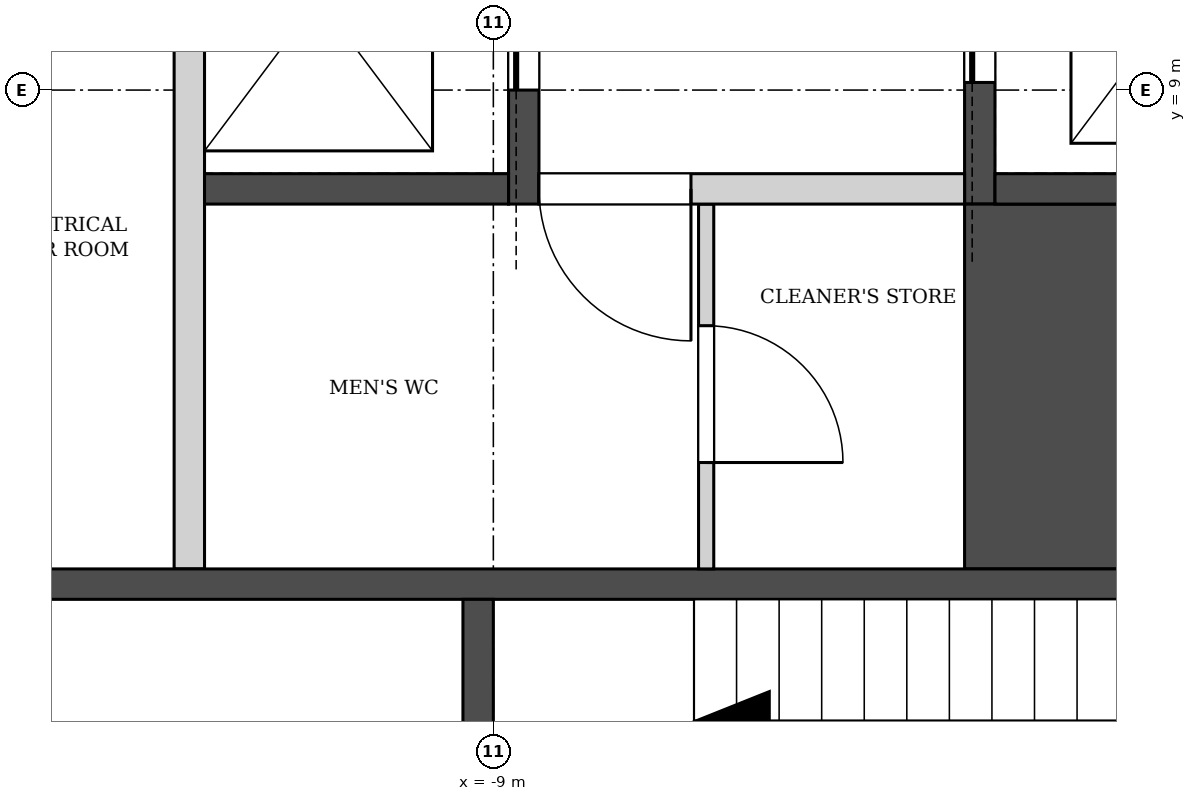
"""IFC4 building model, lengths in metres.
Left out: names, types, materials, properties, quantities, classifications, styles, units other than length and angle.
Written with IfcOpenShell. Run it as: python <this file> out.ifc"""

import sys

from ifc_helpers import new_model, si_unit, direction, frame, frame_2d, origin, place, context, subcontext, project, spatial, rectangle, extrude, element, fill, save


model = new_model("IFC4")
c1 = context("Model", 3, precision=1e-05, world=origin(), true_north=direction((0.0, 1.0)))
c2 = subcontext(c1, "Body", "Model", "MODEL_VIEW")
j1 = project(units=[si_unit("LENGTHUNIT", "METRE"), si_unit("PLANEANGLEUNIT", "RADIAN")], contexts=[c1])
p1 = place(None, origin())
s1 = spatial("IfcSite", under=j1, at=p1, CompositionType="ELEMENT")
p2 = place(p1, origin())
s2 = spatial("IfcBuilding", under=s1, at=p2, CompositionType="ELEMENT")
p3 = place(p2, frame((0.0, 0.0, 20.0)))
s3 = spatial("IfcBuildingStorey", under=s2, at=p3, CompositionType="ELEMENT", Elevation=20.0)
p4 = place(p3, frame((-4.853, 74.393, 0.0), z_axis=(0.0, 0.0, 1.0), x_axis=(-0.49999894854, -0.866026010844, 0.0)))
e1 = element("IfcWall", 1, at=p4, inside=s3, PredefinedType="SOLIDWALL", context=c2, shape_type="SweptSolid", body=[
    extrude(rectangle(XDim=76.0, YDim=0.34, at=frame_2d((38.0, 0.0))), origin(), (0.0, 0.0, 1.0), 3.0),
])
p5 = place(p4, frame((1.058, 0.0, 0.9)))
e2 = element("IfcOpeningElement", 2, at=p5, cuts=e1, PredefinedType="OPENING", context=c2, shape_type="SweptSolid", body=[
    extrude(rectangle(XDim=1.885, YDim=1.9, at=frame_2d((0.942, 0.95))), frame((0.0, 0.18, 0.0), z_axis=(0.0, -1.0, 0.0), x_axis=(1.0, 0.0, 0.0)), (0.0, 0.0, 1.0), 0.36),
])
p6 = place(p4, frame((4.058, 0.0, 0.9)))
e3 = element("IfcOpeningElement", 3, at=p6, cuts=e1, PredefinedType="OPENING", context=c2, shape_type="SweptSolid", body=[
    extrude(rectangle(XDim=1.885, YDim=1.9, at=frame_2d((0.942, 0.95))), frame((0.0, 0.18, 0.0), z_axis=(0.0, -1.0, 0.0), x_axis=(1.0, 0.0, 0.0)), (0.0, 0.0, 1.0), 0.36),
])
p7 = place(p4, frame((7.058, 0.0, 0.9)))
e4 = element("IfcOpeningElement", 4, at=p7, cuts=e1, PredefinedType="OPENING", context=c2, shape_type="SweptSolid", body=[
    extrude(rectangle(XDim=1.885, YDim=1.9, at=frame_2d((0.942, 0.95))), frame((0.0, 0.18, 0.0), z_axis=(0.0, -1.0, 0.0), x_axis=(1.0, 0.0, 0.0)), (0.0, 0.0, 1.0), 0.36),
])
p8 = place(p4, frame((10.058, 0.0, 0.9)))
e5 = element("IfcOpeningElement", 5, at=p8, cuts=e1, PredefinedType="OPENING", context=c2, shape_type="SweptSolid", body=[
    extrude(rectangle(XDim=1.885, YDim=1.9, at=frame_2d((0.942, 0.95))), frame((0.0, 0.18, 0.0), z_axis=(0.0, -1.0, 0.0), x_axis=(1.0, 0.0, 0.0)), (0.0, 0.0, 1.0), 0.36),
])
p9 = place(p4, frame((13.058, 0.0, 0.9)))
e6 = element("IfcOpeningElement", 6, at=p9, cuts=e1, PredefinedType="OPENING", context=c2, shape_type="SweptSolid", body=[
    extrude(rectangle(XDim=1.885, YDim=1.9, at=frame_2d((0.942, 0.95))), frame((0.0, 0.18, 0.0), z_axis=(0.0, -1.0, 0.0), x_axis=(1.0, 0.0, 0.0)), (0.0, 0.0, 1.0), 0.36),
])
p10 = place(p4, frame((16.058, 0.0, 0.9)))
e7 = element("IfcOpeningElement", 7, at=p10, cuts=e1, PredefinedType="OPENING", context=c2, shape_type="SweptSolid", body=[
    extrude(rectangle(XDim=1.885, YDim=1.9, at=frame_2d((0.942, 0.95))), frame((0.0, 0.18, 0.0), z_axis=(0.0, -1.0, 0.0), x_axis=(1.0, 0.0, 0.0)), (0.0, 0.0, 1.0), 0.36),
])
p11 = place(p4, frame((19.058, 0.0, 0.9)))
e8 = element("IfcOpeningElement", 8, at=p11, cuts=e1, PredefinedType="OPENING", context=c2, shape_type="SweptSolid", body=[
    extrude(rectangle(XDim=1.885, YDim=1.9, at=frame_2d((0.942, 0.95))), frame((0.0, 0.18, 0.0), z_axis=(0.0, -1.0, 0.0), x_axis=(1.0, 0.0, 0.0)), (0.0, 0.0, 1.0), 0.36),
])
p12 = place(p4, frame((22.058, 0.0, 0.9)))
e9 = element("IfcOpeningElement", 9, at=p12, cuts=e1, PredefinedType="OPENING", context=c2, shape_type="SweptSolid", body=[
    extrude(rectangle(XDim=1.885, YDim=1.9, at=frame_2d((0.942, 0.95))), frame((0.0, 0.18, 0.0), z_axis=(0.0, -1.0, 0.0), x_axis=(1.0, 0.0, 0.0)), (0.0, 0.0, 1.0), 0.36),
])
p13 = place(p4, frame((25.058, 0.0, 0.9)))
e10 = element("IfcOpeningElement", 10, at=p13, cuts=e1, PredefinedType="OPENING", context=c2, shape_type="SweptSolid", body=[
    extrude(rectangle(XDim=1.885, YDim=1.9, at=frame_2d((0.942, 0.95))), frame((0.0, 0.18, 0.0), z_axis=(0.0, -1.0, 0.0), x_axis=(1.0, 0.0, 0.0)), (0.0, 0.0, 1.0), 0.36),
])
p14 = place(p4, frame((28.058, 0.0, 0.9)))
e11 = element("IfcOpeningElement", 11, at=p14, cuts=e1, PredefinedType="OPENING", context=c2, shape_type="SweptSolid", body=[
    extrude(rectangle(XDim=1.885, YDim=1.9, at=frame_2d((0.942, 0.95))), frame((0.0, 0.18, 0.0), z_axis=(0.0, -1.0, 0.0), x_axis=(1.0, 0.0, 0.0)), (0.0, 0.0, 1.0), 0.36),
])
p15 = place(p4, frame((31.058, 0.0, 0.9)))
e12 = element("IfcOpeningElement", 12, at=p15, cuts=e1, PredefinedType="OPENING", context=c2, shape_type="SweptSolid", body=[
    extrude(rectangle(XDim=1.885, YDim=1.9, at=frame_2d((0.942, 0.95))), frame((0.0, 0.18, 0.0), z_axis=(0.0, -1.0, 0.0), x_axis=(1.0, 0.0, 0.0)), (0.0, 0.0, 1.0), 0.36),
])
p16 = place(p4, frame((34.058, 0.0, 0.9)))
e13 = element("IfcOpeningElement", 13, at=p16, cuts=e1, PredefinedType="OPENING", context=c2, shape_type="SweptSolid", body=[
    extrude(rectangle(XDim=1.885, YDim=1.9, at=frame_2d((0.942, 0.95))), frame((0.0, 0.18, 0.0), z_axis=(0.0, -1.0, 0.0), x_axis=(1.0, 0.0, 0.0)), (0.0, 0.0, 1.0), 0.36),
])
p17 = place(p4, frame((37.058, 0.0, 0.9)))
e14 = element("IfcOpeningElement", 14, at=p17, cuts=e1, PredefinedType="OPENING", context=c2, shape_type="SweptSolid", body=[
    extrude(rectangle(XDim=1.885, YDim=1.9, at=frame_2d((0.942, 0.95))), frame((0.0, 0.18, 0.0), z_axis=(0.0, -1.0, 0.0), x_axis=(1.0, 0.0, 0.0)), (0.0, 0.0, 1.0), 0.36),
])
p18 = place(p4, frame((40.058, 0.0, 0.9)))
e15 = element("IfcOpeningElement", 15, at=p18, cuts=e1, PredefinedType="OPENING", context=c2, shape_type="SweptSolid", body=[
    extrude(rectangle(XDim=1.885, YDim=1.9, at=frame_2d((0.942, 0.95))), frame((0.0, 0.18, 0.0), z_axis=(0.0, -1.0, 0.0), x_axis=(1.0, 0.0, 0.0)), (0.0, 0.0, 1.0), 0.36),
])
p19 = place(p4, frame((43.058, 0.0, 0.9)))
e16 = element("IfcOpeningElement", 16, at=p19, cuts=e1, PredefinedType="OPENING", context=c2, shape_type="SweptSolid", body=[
    extrude(rectangle(XDim=1.885, YDim=1.9, at=frame_2d((0.942, 0.95))), frame((0.0, 0.18, 0.0), z_axis=(0.0, -1.0, 0.0), x_axis=(1.0, 0.0, 0.0)), (0.0, 0.0, 1.0), 0.36),
])
p20 = place(p4, frame((46.058, 0.0, 0.9)))
e17 = element("IfcOpeningElement", 17, at=p20, cuts=e1, PredefinedType="OPENING", context=c2, shape_type="SweptSolid", body=[
    extrude(rectangle(XDim=1.885, YDim=1.9, at=frame_2d((0.942, 0.95))), frame((0.0, 0.18, 0.0), z_axis=(0.0, -1.0, 0.0), x_axis=(1.0, 0.0, 0.0)), (0.0, 0.0, 1.0), 0.36),
])
p21 = place(p4, frame((49.058, 0.0, 0.9)))
e18 = element("IfcOpeningElement", 18, at=p21, cuts=e1, PredefinedType="OPENING", context=c2, shape_type="SweptSolid", body=[
    extrude(rectangle(XDim=1.885, YDim=1.9, at=frame_2d((0.942, 0.95))), frame((0.0, 0.18, 0.0), z_axis=(0.0, -1.0, 0.0), x_axis=(1.0, 0.0, 0.0)), (0.0, 0.0, 1.0), 0.36),
])
p22 = place(p4, frame((52.058, 0.0, 0.9)))
e19 = element("IfcOpeningElement", 19, at=p22, cuts=e1, PredefinedType="OPENING", context=c2, shape_type="SweptSolid", body=[
    extrude(rectangle(XDim=1.885, YDim=1.9, at=frame_2d((0.942, 0.95))), frame((0.0, 0.18, 0.0), z_axis=(0.0, -1.0, 0.0), x_axis=(1.0, 0.0, 0.0)), (0.0, 0.0, 1.0), 0.36),
])
p23 = place(p4, frame((55.058, 0.0, 0.9)))
e20 = element("IfcOpeningElement", 20, at=p23, cuts=e1, PredefinedType="OPENING", context=c2, shape_type="SweptSolid", body=[
    extrude(rectangle(XDim=1.885, YDim=1.9, at=frame_2d((0.942, 0.95))), frame((0.0, 0.18, 0.0), z_axis=(0.0, -1.0, 0.0), x_axis=(1.0, 0.0, 0.0)), (0.0, 0.0, 1.0), 0.36),
])
p24 = place(p4, frame((58.058, 0.0, 0.9)))
e21 = element("IfcOpeningElement", 21, at=p24, cuts=e1, PredefinedType="OPENING", context=c2, shape_type="SweptSolid", body=[
    extrude(rectangle(XDim=1.885, YDim=1.9, at=frame_2d((0.942, 0.95))), frame((0.0, 0.18, 0.0), z_axis=(0.0, -1.0, 0.0), x_axis=(1.0, 0.0, 0.0)), (0.0, 0.0, 1.0), 0.36),
])
p25 = place(p4, frame((61.058, 0.0, 0.9)))
e22 = element("IfcOpeningElement", 22, at=p25, cuts=e1, PredefinedType="OPENING", context=c2, shape_type="SweptSolid", body=[
    extrude(rectangle(XDim=1.885, YDim=1.9, at=frame_2d((0.942, 0.95))), frame((0.0, 0.18, 0.0), z_axis=(0.0, -1.0, 0.0), x_axis=(1.0, 0.0, 0.0)), (0.0, 0.0, 1.0), 0.36),
])
p26 = place(p4, frame((64.058, 0.0, 0.9)))
e23 = element("IfcOpeningElement", 23, at=p26, cuts=e1, PredefinedType="OPENING", context=c2, shape_type="SweptSolid", body=[
    extrude(rectangle(XDim=1.885, YDim=1.9, at=frame_2d((0.942, 0.95))), frame((0.0, 0.18, 0.0), z_axis=(0.0, -1.0, 0.0), x_axis=(1.0, 0.0, 0.0)), (0.0, 0.0, 1.0), 0.36),
])
p27 = place(p4, frame((67.058, 0.0, 0.9)))
e24 = element("IfcOpeningElement", 24, at=p27, cuts=e1, PredefinedType="OPENING", context=c2, shape_type="SweptSolid", body=[
    extrude(rectangle(XDim=1.885, YDim=1.9, at=frame_2d((0.942, 0.95))), frame((0.0, 0.18, 0.0), z_axis=(0.0, -1.0, 0.0), x_axis=(1.0, 0.0, 0.0)), (0.0, 0.0, 1.0), 0.36),
])
p28 = place(p4, frame((70.058, 0.0, 0.9)))
e25 = element("IfcOpeningElement", 25, at=p28, cuts=e1, PredefinedType="OPENING", context=c2, shape_type="SweptSolid", body=[
    extrude(rectangle(XDim=1.885, YDim=1.9, at=frame_2d((0.942, 0.95))), frame((0.0, 0.18, 0.0), z_axis=(0.0, -1.0, 0.0), x_axis=(1.0, 0.0, 0.0)), (0.0, 0.0, 1.0), 0.36),
])
p29 = place(p4, frame((73.058, 0.0, 0.9)))
e26 = element("IfcOpeningElement", 26, at=p29, cuts=e1, PredefinedType="OPENING", context=c2, shape_type="SweptSolid", body=[
    extrude(rectangle(XDim=1.885, YDim=1.9, at=frame_2d((0.942, 0.95))), frame((0.0, 0.18, 0.0), z_axis=(0.0, -1.0, 0.0), x_axis=(1.0, 0.0, 0.0)), (0.0, 0.0, 1.0), 0.36),
])
p30 = place(p3, frame((-11.0, 5.85, 0.0), z_axis=(0.0, 0.0, 1.0), x_axis=(0.0, 1.0, 0.0)))
e27 = element("IfcWall", 27, at=p30, inside=s3, PredefinedType="SOLIDWALL", context=c2, shape_type="SweptSolid", body=[
    extrude(rectangle(XDim=7.4, YDim=0.2, at=frame_2d((3.7, 0.0))), origin(), (0.0, 0.0, 1.0), 3.0),
])
p31 = place(p3, frame((-8.8, 8.25, -0.3), z_axis=(0.0, 0.0, 1.0), x_axis=(0.0, 1.0, 0.0)))
e28 = element("IfcWall", 28, at=p31, inside=s3, PredefinedType="SOLIDWALL", context=c2, shape_type="SweptSolid", body=[
    extrude(rectangle(XDim=5.2, YDim=0.2, at=frame_2d((2.6, 0.0))), origin(), (0.0, 0.0, 1.0), 3.3),
])
p32 = place(p31, frame((0.75, 0.0, 0.3)))
e29 = element("IfcOpeningElement", 29, at=p32, cuts=e28, PredefinedType="OPENING", context=c2, shape_type="SweptSolid", body=[
    extrude(rectangle(XDim=1.2, YDim=2.1, at=frame_2d((0.6, 1.05))), frame((0.0, 0.11, 0.0), z_axis=(0.0, -1.0, 0.0), x_axis=(1.0, 0.0, 0.0)), (0.0, 0.0, 1.0), 0.22),
])
p33 = place(p31, frame((3.25, 0.0, 0.3)))
e30 = element("IfcOpeningElement", 30, at=p33, cuts=e28, PredefinedType="OPENING", context=c2, shape_type="SweptSolid", body=[
    extrude(rectangle(XDim=1.2, YDim=2.1, at=frame_2d((0.6, 1.05))), frame((0.0, 0.11, 0.0), z_axis=(0.0, -1.0, 0.0), x_axis=(1.0, 0.0, 0.0)), (0.0, 0.0, 1.0), 0.22),
])
p34 = place(p3, frame((-5.8, 8.25, -0.3), z_axis=(0.0, 0.0, 1.0), x_axis=(0.0, 1.0, 0.0)))
e31 = element("IfcWall", 31, at=p34, inside=s3, PredefinedType="SOLIDWALL", context=c2, shape_type="SweptSolid", body=[
    extrude(rectangle(XDim=8.0, YDim=0.2, at=frame_2d((4.0, 0.0))), origin(), (0.0, 0.0, 1.0), 3.3),
])
p35 = place(p34, frame((0.8, 0.0, 0.3)))
e32 = element("IfcOpeningElement", 32, at=p35, cuts=e31, PredefinedType="OPENING", context=c2, shape_type="SweptSolid", body=[
    extrude(rectangle(XDim=1.2, YDim=2.1, at=frame_2d((0.6, 1.05))), frame((0.0, 0.11, 0.0), z_axis=(0.0, -1.0, 0.0), x_axis=(1.0, 0.0, 0.0)), (0.0, 0.0, 1.0), 0.22),
])
p36 = place(p34, frame((3.4, 0.0, 0.3)))
e33 = element("IfcOpeningElement", 33, at=p36, cuts=e31, PredefinedType="OPENING", context=c2, shape_type="SweptSolid", body=[
    extrude(rectangle(XDim=1.2, YDim=2.1, at=frame_2d((0.6, 1.05))), frame((0.0, 0.11, 0.0), z_axis=(0.0, -1.0, 0.0), x_axis=(1.0, 0.0, 0.0)), (0.0, 0.0, 1.0), 0.22),
])
p37 = place(p34, frame((6.0, 0.0, 0.3)))
e34 = element("IfcOpeningElement", 34, at=p37, cuts=e31, PredefinedType="OPENING", context=c2, shape_type="SweptSolid", body=[
    extrude(rectangle(XDim=1.2, YDim=2.1, at=frame_2d((0.6, 1.05))), frame((0.0, 0.11, 0.0), z_axis=(0.0, -1.0, 0.0), x_axis=(1.0, 0.0, 0.0)), (0.0, 0.0, 1.0), 0.22),
])
p38 = place(p3, frame((-5.2, 5.85, -0.3), z_axis=(0.0, 0.0, 1.0), x_axis=(0.0, 1.0, 0.0)))
e35 = element("IfcWall", 35, at=p38, inside=s3, PredefinedType="SOLIDWALL", context=c2, shape_type="SweptSolid", body=[
    extrude(rectangle(XDim=2.4, YDim=1.4, at=frame_2d((1.2, 0.0))), origin(), (0.0, 0.0, 1.0), 3.3),
])
p39 = place(p3, frame((-10.9, 8.35, -0.3), z_axis=(0.0, 0.0, 1.0), x_axis=(1.0, 0.0, 0.0)))
e36 = element("IfcWall", 36, at=p39, inside=s3, PredefinedType="SOLIDWALL", context=c2, shape_type="SweptSolid", body=[
    extrude(rectangle(XDim=2.0, YDim=0.2, at=frame_2d((1.0, 0.0))), origin(), (0.0, 0.0, 1.0), 3.3),
])
p40 = place(p3, frame((-5.7, 8.35, -0.3), z_axis=(0.0, 0.0, 1.0), x_axis=(1.0, 0.0, 0.0)))
e37 = element("IfcWall", 37, at=p40, inside=s3, PredefinedType="SOLIDWALL", context=c2, shape_type="SweptSolid", body=[
    extrude(rectangle(XDim=4.2, YDim=0.2, at=frame_2d((2.1, 0.0))), origin(), (0.0, 0.0, 1.0), 3.3),
])
p41 = place(p3, frame((-12.6, 5.75, -0.3), z_axis=(0.0, 0.0, 1.0), x_axis=(1.0, 0.0, 0.0)))
e38 = element("IfcWall", 38, at=p41, inside=s3, PredefinedType="SOLIDWALL", context=c2, shape_type="SweptSolid", body=[
    extrude(rectangle(XDim=11.4, YDim=0.2, at=frame_2d((5.7, 0.0))), origin(), (0.0, 0.0, 1.0), 3.3),
])
p42 = place(p3, frame((-9.1, 2.25, -0.3), z_axis=(0.0, 0.0, 1.0), x_axis=(0.0, 1.0, 0.0)))
e39 = element("IfcWall", 39, at=p42, inside=s3, PredefinedType="SOLIDWALL", context=c2, shape_type="SweptSolid", body=[
    extrude(rectangle(XDim=3.4, YDim=0.2, at=frame_2d((1.7, 0.0))), origin(), (0.0, 0.0, 1.0), 3.3),
])
p43 = place(p42, frame((0.2, 0.0, 0.3)))
e40 = element("IfcOpeningElement", 40, at=p43, cuts=e39, PredefinedType="OPENING", context=c2, shape_type="SweptSolid", body=[
    extrude(rectangle(XDim=1.2, YDim=2.1, at=frame_2d((0.6, 1.05))), frame((0.0, 0.11, 0.0), z_axis=(0.0, -1.0, 0.0), x_axis=(1.0, 0.0, 0.0)), (0.0, 0.0, 1.0), 0.22),
])
p44 = place(p3, frame((-7.6, 5.85, 0.0), z_axis=(0.0, 0.0, 1.0), x_axis=(0.0, 1.0, 0.0)))
e41 = element("IfcWall", 41, at=p44, inside=s3, PredefinedType="PARTITIONING", context=c2, shape_type="SweptSolid", body=[
    extrude(rectangle(XDim=2.4, YDim=0.1, at=frame_2d((1.2, 0.0))), origin(), (0.0, 0.0, 1.0), 3.0),
])
p45 = place(p44, frame((0.7, 0.0, 0.0)))
e42 = element("IfcOpeningElement", 42, at=p45, cuts=e41, PredefinedType="OPENING", context=c2, shape_type="SweptSolid", body=[
    extrude(rectangle(XDim=0.9, YDim=2.1, at=frame_2d((0.45, 1.05))), frame((0.0, 0.06, 0.0), z_axis=(0.0, -1.0, 0.0), x_axis=(1.0, 0.0, 0.0)), (0.0, 0.0, 1.0), 0.12),
])
p46 = place(p3, frame((-8.7, 8.35, 0.0), z_axis=(0.0, 0.0, 1.0), x_axis=(1.0, 0.0, 0.0)))
e43 = element("IfcWall", 43, at=p46, inside=s3, PredefinedType="SOLIDWALL", context=c2, shape_type="SweptSolid", body=[
    extrude(rectangle(XDim=2.8, YDim=0.2, at=frame_2d((1.4, 0.0))), origin(), (0.0, 0.0, 1.0), 3.0),
])
p47 = place(p46, origin())
e44 = element("IfcOpeningElement", 44, at=p47, cuts=e43, PredefinedType="OPENING", context=c2, shape_type="SweptSolid", body=[
    extrude(rectangle(XDim=1.0, YDim=2.1, at=frame_2d((0.5, 1.05))), frame((0.0, 0.11, 0.0), z_axis=(0.0, -1.0, 0.0), x_axis=(1.0, 0.0, 0.0)), (0.0, 0.0, 1.0), 0.22),
])
p48 = place(p32, origin())
e45 = element("IfcDoor", 45, at=p48, inside=s3, OperationType="SLIDING_TO_LEFT", PredefinedType="DOOR", context=c2, shape_type="SweptSolid", body=[
    extrude(rectangle(XDim=1.2, YDim=2.1, at=frame_2d((0.6, 1.05))), frame((0.0, 0.025, 0.0), z_axis=(0.0, -1.0, 0.0), x_axis=(1.0, 0.0, 0.0)), (0.0, 0.0, 1.0), 0.05),
])
fill(e29, e45)
p49 = place(p35, origin())
e46 = element("IfcDoor", 46, at=p49, inside=s3, OperationType="SLIDING_TO_LEFT", PredefinedType="DOOR", context=c2, shape_type="SweptSolid", body=[
    extrude(rectangle(XDim=1.2, YDim=2.1, at=frame_2d((0.6, 1.05))), frame((0.0, 0.025, 0.0), z_axis=(0.0, -1.0, 0.0), x_axis=(1.0, 0.0, 0.0)), (0.0, 0.0, 1.0), 0.05),
])
fill(e32, e46)
p50 = place(p47, frame((1.0, 0.0, 0.0), z_axis=(0.0, 0.0, 1.0), x_axis=(-1.0, 0.0, 0.0)))
e47 = element("IfcDoor", 47, at=p50, inside=s3, OperationType="SINGLE_SWING_LEFT", PredefinedType="DOOR", context=c2, shape_type="SweptSolid", body=[
    extrude(rectangle(XDim=1.0, YDim=2.1, at=frame_2d((0.5, 1.05))), frame((0.0, 0.025, 0.0), z_axis=(0.0, -1.0, 0.0), x_axis=(1.0, 0.0, 0.0)), (0.0, 0.0, 1.0), 0.05),
])
fill(e44, e47)
p51 = place(p45, frame((0.9, 0.0, 0.0), z_axis=(0.0, 0.0, 1.0), x_axis=(-1.0, 0.0, 0.0)))
e48 = element("IfcDoor", 48, at=p51, inside=s3, OperationType="SINGLE_SWING_RIGHT", PredefinedType="DOOR", context=c2, shape_type="SweptSolid", body=[
    extrude(rectangle(XDim=0.9, YDim=2.1, at=frame_2d((0.45, 1.05))), frame((0.0, 0.025, 0.0), z_axis=(0.0, -1.0, 0.0), x_axis=(1.0, 0.0, 0.0)), (0.0, 0.0, 1.0), 0.05),
])
fill(e42, e48)
save(model, sys.argv[1])
